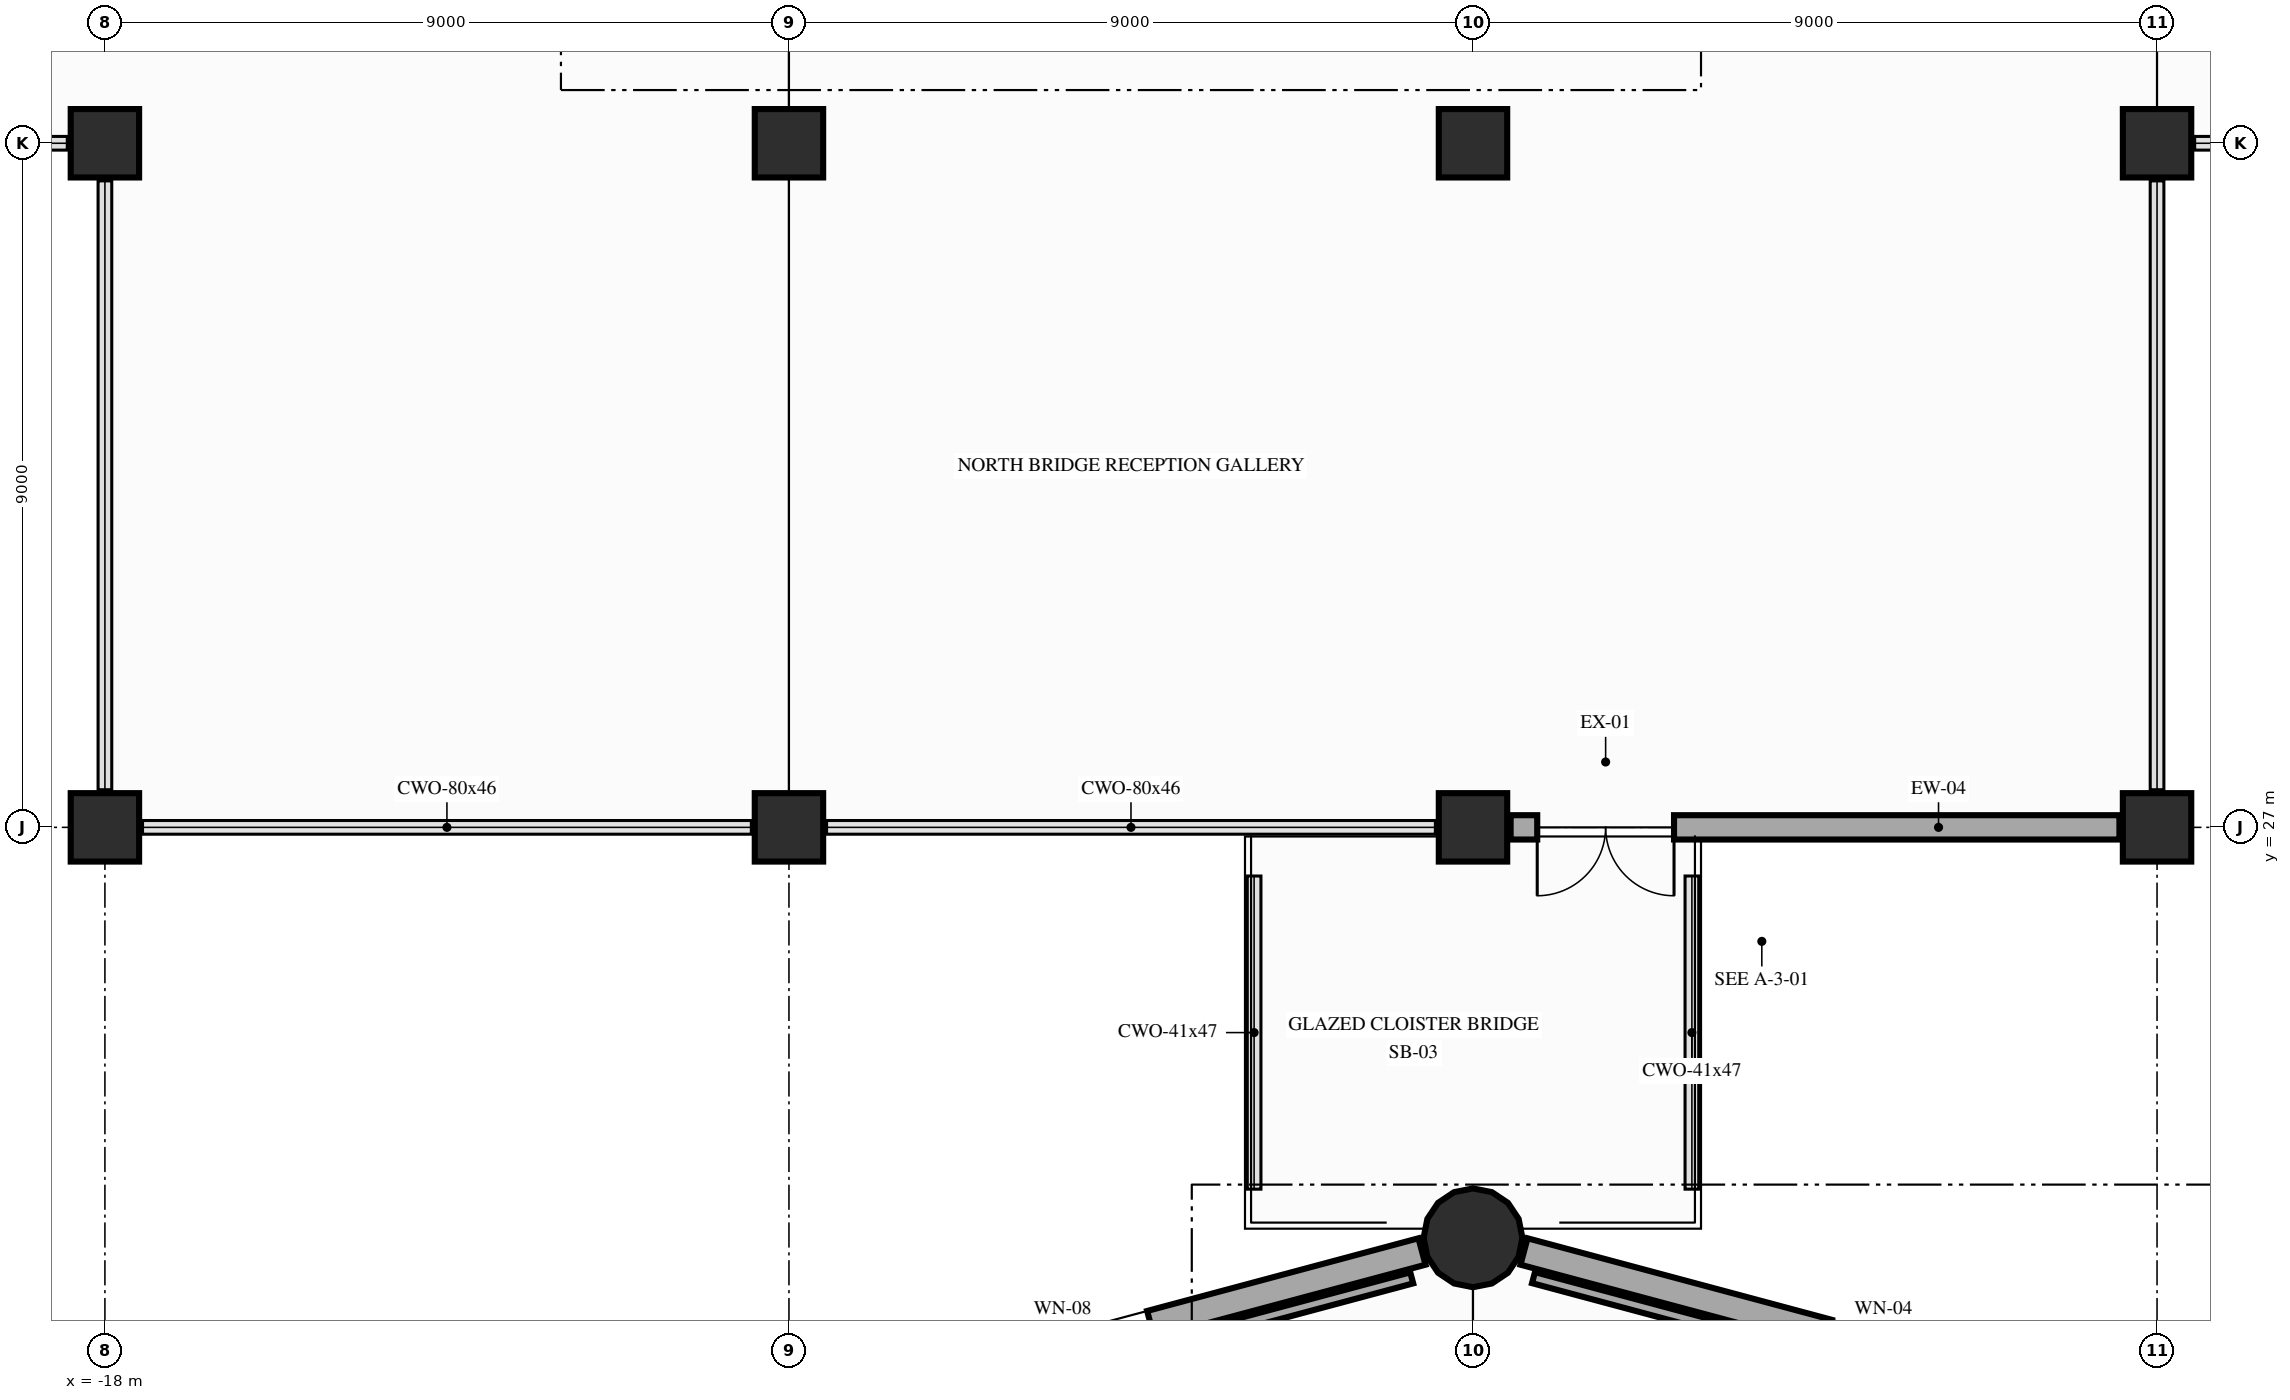
"""IFC4 building model, lengths in metres.
Left out: names, types, materials, properties, quantities, classifications, styles, units other than length and angle.
Written with IfcOpenShell. Run it as: python <this file> out.ifc"""

import sys

from ifc_helpers import new_model, si_unit, direction, frame, frame_2d, origin, origin_2d, place, context, subcontext, project, spatial, rectangle, circle, extrude, element, fill, save


model = new_model("IFC4")
c1 = context("Model", 3, precision=1e-05, world=origin(), true_north=direction((0.0, 1.0)))
c2 = subcontext(c1, "Body", "Model", "MODEL_VIEW")
j1 = project(units=[si_unit("LENGTHUNIT", "METRE"), si_unit("PLANEANGLEUNIT", "RADIAN")], contexts=[c1])
p1 = place(None, origin())
s1 = spatial("IfcSite", under=j1, at=p1, CompositionType="ELEMENT")
p2 = place(p1, origin())
s2 = spatial("IfcBuilding", under=s1, at=p2, CompositionType="ELEMENT")
p3 = place(p2, frame((0.0, 0.0, 10.8)))
s3 = spatial("IfcBuildingStorey", under=s2, at=p3, CompositionType="ELEMENT", Elevation=10.8)
p4 = place(p3, frame((0.0, 21.6, 0.0), z_axis=(0.0, 0.0, 1.0), x_axis=(0.0, 1.0, 0.0)))
e1 = element("IfcColumn", 1, at=p4, inside=s3, PredefinedType="COLUMN", context=c2, shape_type="SweptSolid", body=[
    extrude(circle(Radius=0.65, at=origin_2d()), origin(), (0.0, 0.0, 1.0), 5.4),
])
for number, where, z_axis, x_axis in (
    (2, (-18.0, 27.0, 0.0), (0.0, 0.0, 1.0), (1.0, 0.0, 0.0)),
    (3, (-18.0, 36.0, 0.0), (0.0, 0.0, 1.0), (1.0, 0.0, 0.0)),
    (4, (-9.0, 27.0, 0.0), (0.0, 0.0, 1.0), (1.0, 0.0, 0.0)),
    (5, (-9.0, 36.0, 0.0), (0.0, 0.0, 1.0), (1.0, 0.0, 0.0)),
    (6, (0.0, 27.0, 0.0), (0.0, 0.0, 1.0), (1.0, 0.0, 0.0)),
    (7, (0.0, 36.0, 0.0), (0.0, 0.0, 1.0), (1.0, 0.0, 0.0)),
    (8, (9.0, 27.0, 0.0), (0.0, 0.0, 1.0), (1.0, 0.0, 0.0)),
    (9, (9.0, 36.0, 0.0), (0.0, 0.0, 1.0), (1.0, 0.0, 0.0)),
):
    element("IfcColumn", number, at=place(p3, frame(where, z_axis=z_axis, x_axis=x_axis)), inside=s3, PredefinedType="COLUMN", context=c2, shape_type="SweptSolid", body=[
        extrude(rectangle(XDim=0.9, YDim=0.9, at=origin_2d()), origin(), (0.0, 0.0, 1.0), 5.4),
    ])
p5 = place(p3, frame((0.671, 21.42, 0.0), z_axis=(0.0, 0.0, 1.0), x_axis=(0.965934251614, -0.258787599316, 0.0)))
e10 = element("IfcWall", 10, at=p5, inside=s3, PredefinedType="SOLIDWALL", context=c2, shape_type="SweptSolid", body=[
    extrude(rectangle(XDim=9.792, YDim=0.36, at=frame_2d((4.896, 0.0))), origin(), (0.0, 0.0, 1.0), 4.395),
])
p6 = place(p5, frame((4.146, 0.0, 0.9)))
e11 = element("IfcOpeningElement", 11, at=p6, cuts=e10, PredefinedType="OPENING", context=c2, shape_type="SweptSolid", body=[
    extrude(rectangle(XDim=1.5, YDim=2.4, at=frame_2d((0.75, 1.2))), frame((0.0, 0.19, 0.0), z_axis=(0.0, -1.0, 0.0), x_axis=(1.0, 0.0, 0.0)), (0.0, 0.0, 1.0), 0.38),
])
p7 = place(p3, frame((-10.129, 18.886, 0.0), z_axis=(0.0, 0.0, 1.0), x_axis=(0.965934251614, 0.258787599316, 0.0)))
e12 = element("IfcWall", 12, at=p7, inside=s3, PredefinedType="SOLIDWALL", context=c2, shape_type="SweptSolid", body=[
    extrude(rectangle(XDim=9.792, YDim=0.36, at=frame_2d((4.896, 0.0))), origin(), (0.0, 0.0, 1.0), 4.395),
])
p8 = place(p7, frame((3.696, 0.0, 0.9)))
e13 = element("IfcOpeningElement", 13, at=p8, cuts=e12, PredefinedType="OPENING", context=c2, shape_type="SweptSolid", body=[
    extrude(rectangle(XDim=2.4, YDim=2.4, at=frame_2d((1.2, 1.2))), frame((0.0, 0.19, 0.0), z_axis=(0.0, -1.0, 0.0), x_axis=(1.0, 0.0, 0.0)), (0.0, 0.0, 1.0), 0.38),
])
p9 = place(p3, frame((8.505, 27.0, 0.0), z_axis=(0.0, 0.0, 1.0), x_axis=(-1.0, 0.0, 0.0)))
e14 = element("IfcWall", 14, at=p9, inside=s3, PredefinedType="SOLIDWALL", context=c2, shape_type="SweptSolid", body=[
    extrude(rectangle(XDim=8.01, YDim=0.32, at=frame_2d((4.005, 0.0))), origin(), (0.0, 0.0, 1.0), 4.445),
])
p10 = place(p9, frame((5.86, 0.0, 0.0)))
e15 = element("IfcOpeningElement", 15, at=p10, cuts=e14, PredefinedType="OPENING", context=c2, shape_type="SweptSolid", body=[
    extrude(rectangle(XDim=1.8, YDim=2.2, at=frame_2d((0.9, 1.1))), frame((0.0, 0.17, 0.0), z_axis=(0.0, -1.0, 0.0), x_axis=(1.0, 0.0, 0.0)), (0.0, 0.0, 1.0), 0.34),
])
p11 = place(p3, frame((10.04, 18.597, 0.0), z_axis=(0.0, 0.0, 1.0), x_axis=(-0.965872416838, 0.259018289684, 0.0)))
e16 = element("IfcWall", 16, at=p11, inside=s3, PredefinedType="PARTITIONING", context=c2, shape_type="SweptSolid", body=[
    extrude(rectangle(XDim=9.571, YDim=0.15, at=frame_2d((4.785, 0.0))), origin(), (0.0, 0.0, 1.0), 4.395),
])
p12 = place(p3, frame((-0.806, 21.073, 0.0), z_axis=(0.0, 0.0, 1.0), x_axis=(-0.965936310931, -0.258779912716, 0.0)))
e17 = element("IfcWall", 17, at=p12, inside=s3, PredefinedType="PARTITIONING", context=c2, shape_type="SweptSolid", body=[
    extrude(rectangle(XDim=9.56, YDim=0.15, at=frame_2d((4.78, 0.0))), origin(), (0.0, 0.0, 1.0), 4.395),
])
p13 = place(p10, origin())
e18 = element("IfcDoor", 18, at=p13, inside=s3, OperationType="DOUBLE_DOOR_SINGLE_SWING", PredefinedType="DOOR", context=c2, shape_type="SweptSolid", body=[
    extrude(rectangle(XDim=1.8, YDim=2.2, at=frame_2d((0.9, 1.1))), frame((0.0, 0.025, 0.0), z_axis=(0.0, -1.0, 0.0), x_axis=(1.0, 0.0, 0.0)), (0.0, 0.0, 1.0), 0.05),
])
fill(e15, e18)
save(model, sys.argv[1])
